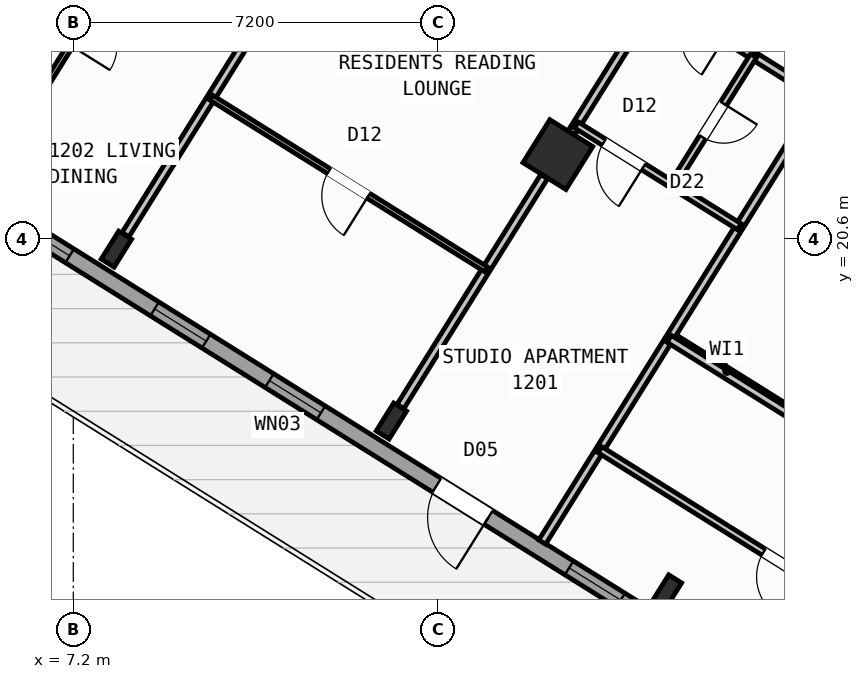
"""IFC4 building model, lengths in metres.
Left out: names, types, materials, properties, quantities, classifications, styles, units other than length and angle.
Written with IfcOpenShell. Run it as: python <this file> out.ifc"""

import sys

from ifc_helpers import new_model, si_unit, direction, frame, frame_2d, origin, origin_2d, place, context, subcontext, project, spatial, rectangle, hollow_rectangle, i_section, extrude, source, transform, mapped, element, fill, save


model = new_model("IFC4")
c1 = context("Model", 3, precision=1e-05, world=origin(), true_north=direction((0.0, 1.0)))
c2 = subcontext(c1, "Body", "Model", "MODEL_VIEW")
j1 = project(units=[si_unit("LENGTHUNIT", "METRE"), si_unit("PLANEANGLEUNIT", "RADIAN")], contexts=[c1])
p1 = place(None, origin())
s1 = spatial("IfcSite", under=j1, at=p1, CompositionType="ELEMENT")
p2 = place(p1, origin())
s2 = spatial("IfcBuilding", under=s1, at=p2, CompositionType="ELEMENT")
p3 = place(p2, frame((0.0, 0.0, 49.2)))
s3 = spatial("IfcBuildingStorey", under=s2, at=p3, CompositionType="ELEMENT", Elevation=49.2)
m1 = source(origin(), c2, "Body", "SweptSolid", [
    extrude(i_section(OverallWidth=0.3, OverallDepth=0.65, WebThickness=0.016, FlangeThickness=0.031, at=origin_2d()), origin(), (0.0, 0.0, 1.0), 3.6),
])
p4 = place(p3, frame((18.906, 13.612, 0.0), z_axis=(0.0, 0.0, 1.0), x_axis=(-0.848048096156, 0.529919264233, 0.0)))
e1 = element("IfcColumn", 1, at=p4, inside=s3, PredefinedType="COLUMN", context=c2, shape_type="MappedRepresentation", body=[
    mapped(m1, transform((0.0, 0.0, 0.0), scale=1.0)),
])
m2 = source(origin(), c2, "Body", "SweptSolid", [
    extrude(hollow_rectangle(XDim=1.0, YDim=1.0, WallThickness=0.04, at=origin_2d()), origin(), (0.0, 0.0, 1.0), 3.6),
])
p5 = place(p3, frame((16.764, 22.261, 0.0), z_axis=(0.0, 0.0, 1.0), x_axis=(-0.848048096156, 0.529919264233, 0.0)))
e2 = element("IfcColumn", 2, at=p5, inside=s3, PredefinedType="COLUMN", context=c2, shape_type="MappedRepresentation", body=[
    mapped(m2, transform((0.0, 0.0, 0.0), scale=1.0)),
])
for number, where, z_axis, x_axis in (
    (3, (13.478, 17.003, 0.0), (0.0, 0.0, 1.0), (-0.848, 0.53, 0.0)),
    (4, (8.051, 20.395, 0.0), (0.0, 0.0, 1.0), (-0.848, 0.53, 0.0)),
):
    element("IfcColumn", number, at=place(p3, frame(where, z_axis=z_axis, x_axis=x_axis)), inside=s3, PredefinedType="COLUMN", context=c2, shape_type="MappedRepresentation", body=[
        mapped(m1, transform((0.0, 0.0, 0.0), scale=1.0)),
    ])
p6 = place(p3, frame((29.268, 6.429, 0.0), z_axis=(0.0, 0.0, 1.0), x_axis=(-0.848049971435, 0.529916263149, 0.0)))
e5 = element("IfcWall", 5, at=p6, inside=s3, PredefinedType="STANDARD", context=c2, shape_type="SweptSolid", body=[
    extrude(rectangle(XDim=31.588, YDim=0.32, at=frame_2d((15.794, 0.0))), origin(), (0.0, 0.0, 1.0), 3.35),
])
p7 = place(p6, frame((16.362, 0.0, 0.0)))
e6 = element("IfcOpeningElement", 6, at=p7, cuts=e5, PredefinedType="OPENING", context=c2, shape_type="SweptSolid", body=[
    extrude(rectangle(XDim=1.2, YDim=2.15, at=frame_2d((0.6, 1.075))), frame((0.0, 0.17, 0.0), z_axis=(0.0, -1.0, 0.0), x_axis=(1.0, 0.0, 0.0)), (0.0, 0.0, 1.0), 0.34),
])
p8 = place(p6, frame((2.989, 0.0, 0.8)))
e7 = element("IfcOpeningElement", 7, at=p8, cuts=e5, PredefinedType="OPENING", context=c2, shape_type="SweptSolid", body=[
    extrude(rectangle(XDim=2.1, YDim=1.55, at=frame_2d((1.05, 0.775))), frame((0.0, 0.17, 0.0), z_axis=(0.0, -1.0, 0.0), x_axis=(1.0, 0.0, 0.0)), (0.0, 0.0, 1.0), 0.34),
])
p9 = place(p6, frame((8.359, 0.0, 0.8)))
e8 = element("IfcOpeningElement", 8, at=p9, cuts=e5, PredefinedType="OPENING", context=c2, shape_type="SweptSolid", body=[
    extrude(rectangle(XDim=2.1, YDim=1.55, at=frame_2d((1.05, 0.775))), frame((0.0, 0.17, 0.0), z_axis=(0.0, -1.0, 0.0), x_axis=(1.0, 0.0, 0.0)), (0.0, 0.0, 1.0), 0.34),
])
p10 = place(p6, frame((13.284, 0.0, 0.95)))
e9 = element("IfcOpeningElement", 9, at=p10, cuts=e5, PredefinedType="OPENING", context=c2, shape_type="SweptSolid", body=[
    extrude(rectangle(XDim=1.2, YDim=1.4, at=frame_2d((0.6, 0.7))), frame((0.0, 0.17, 0.0), z_axis=(0.0, -1.0, 0.0), x_axis=(1.0, 0.0, 0.0)), (0.0, 0.0, 1.0), 0.34),
])
p11 = place(p6, frame((20.259, 0.0, 0.95)))
e10 = element("IfcOpeningElement", 10, at=p11, cuts=e5, PredefinedType="OPENING", context=c2, shape_type="SweptSolid", body=[
    extrude(rectangle(XDim=1.2, YDim=1.4, at=frame_2d((0.6, 0.7))), frame((0.0, 0.17, 0.0), z_axis=(0.0, -1.0, 0.0), x_axis=(1.0, 0.0, 0.0)), (0.0, 0.0, 1.0), 0.34),
])
p12 = place(p6, frame((22.929, 0.0, 0.95)))
e11 = element("IfcOpeningElement", 11, at=p12, cuts=e5, PredefinedType="OPENING", context=c2, shape_type="SweptSolid", body=[
    extrude(rectangle(XDim=1.2, YDim=1.4, at=frame_2d((0.6, 0.7))), frame((0.0, 0.17, 0.0), z_axis=(0.0, -1.0, 0.0), x_axis=(1.0, 0.0, 0.0)), (0.0, 0.0, 1.0), 0.34),
])
p13 = place(p6, frame((26.106, 0.0, 0.85)))
e12 = element("IfcOpeningElement", 12, at=p13, cuts=e5, PredefinedType="OPENING", context=c2, shape_type="SweptSolid", body=[
    extrude(rectangle(XDim=1.5, YDim=1.5, at=frame_2d((0.75, 0.75))), frame((0.0, 0.17, 0.0), z_axis=(0.0, -1.0, 0.0), x_axis=(1.0, 0.0, 0.0)), (0.0, 0.0, 1.0), 0.34),
])
p14 = place(p6, frame((29.068, 0.0, 0.85)))
e13 = element("IfcOpeningElement", 13, at=p14, cuts=e5, PredefinedType="OPENING", context=c2, shape_type="SweptSolid", body=[
    extrude(rectangle(XDim=1.8, YDim=1.5, at=frame_2d((0.9, 0.75))), frame((0.0, 0.17, 0.0), z_axis=(0.0, -1.0, 0.0), x_axis=(1.0, 0.0, 0.0)), (0.0, 0.0, 1.0), 0.34),
])
p15 = place(p3, frame((2.415, 23.452, 0.0), z_axis=(0.0, 0.0, 1.0), x_axis=(0.52991049553, 0.848053575387, 0.0)))
e14 = element("IfcWall", 14, at=p15, inside=s3, PredefinedType="STANDARD", context=c2, shape_type="SweptSolid", body=[
    extrude(rectangle(XDim=21.587, YDim=0.32, at=frame_2d((10.794, 0.0))), origin(), (0.0, 0.0, 1.0), 2.725),
])
p16 = place(p15, frame((2.356, 0.0, 0.8)))
e15 = element("IfcOpeningElement", 15, at=p16, cuts=e14, PredefinedType="OPENING", context=c2, shape_type="SweptSolid", body=[
    extrude(rectangle(XDim=2.1, YDim=1.55, at=frame_2d((1.05, 0.775))), frame((0.0, 0.17, 0.0), z_axis=(0.0, -1.0, 0.0), x_axis=(1.0, 0.0, 0.0)), (0.0, 0.0, 1.0), 0.34),
])
p17 = place(p15, frame((8.639, 0.0, 1.0)))
e16 = element("IfcOpeningElement", 16, at=p17, cuts=e14, PredefinedType="OPENING", context=c2, shape_type="SweptSolid", body=[
    extrude(rectangle(XDim=0.9, YDim=1.25, at=frame_2d((0.45, 0.625))), frame((0.0, 0.17, 0.0), z_axis=(0.0, -1.0, 0.0), x_axis=(1.0, 0.0, 0.0)), (0.0, 0.0, 1.0), 0.34),
])
p18 = place(p15, frame((17.129, 0.0, 0.85)))
e17 = element("IfcOpeningElement", 17, at=p18, cuts=e14, PredefinedType="OPENING", context=c2, shape_type="SweptSolid", body=[
    extrude(rectangle(XDim=1.5, YDim=1.5, at=frame_2d((0.75, 0.75))), frame((0.0, 0.17, 0.0), z_axis=(0.0, -1.0, 0.0), x_axis=(1.0, 0.0, 0.0)), (0.0, 0.0, 1.0), 0.34),
])
p19 = place(p3, frame((21.206, 17.292, 0.0), z_axis=(0.0, 0.0, 1.0), x_axis=(-0.848050851465, 0.529914854792, 0.0)))
e18 = element("IfcWall", 18, at=p19, inside=s3, PredefinedType="PARTITIONING", context=c2, shape_type="SweptSolid", body=[
    extrude(rectangle(XDim=2.61, YDim=0.16, at=frame_2d((1.305, 0.0))), origin(), (0.0, 0.0, 1.0), 3.34),
])
p20 = place(p3, frame((21.938, 23.391, 0.0), z_axis=(0.0, 0.0, 1.0), x_axis=(-0.529924725692, -0.848044683434, 0.0)))
e19 = element("IfcWall", 19, at=p20, inside=s3, PredefinedType="PARTITIONING", context=c2, shape_type="SweptSolid", body=[
    extrude(rectangle(XDim=10.35, YDim=0.16, at=frame_2d((5.175, 0.0))), origin(), (0.0, 0.0, 1.0), 3.34),
])
p21 = place(p3, frame((21.938, 23.391, 0.0), z_axis=(0.0, 0.0, 1.0), x_axis=(-0.848045850158, 0.529922858565, 0.0)))
e20 = element("IfcWall", 20, at=p21, inside=s3, PredefinedType="PARTITIONING", context=c2, shape_type="SweptSolid", body=[
    extrude(rectangle(XDim=16.73, YDim=0.16, at=frame_2d((8.365, 0.0))), origin(), (0.0, 0.0, 1.0), 3.34),
])
p22 = place(p21, frame((2.22, 0.0, 0.0)))
e21 = element("IfcOpeningElement", 21, at=p22, cuts=e20, PredefinedType="OPENING", context=c2, shape_type="SweptSolid", body=[
    extrude(rectangle(XDim=0.86, YDim=2.05, at=frame_2d((0.43, 1.025))), frame((0.0, 0.09, 0.0), z_axis=(0.0, -1.0, 0.0), x_axis=(1.0, 0.0, 0.0)), (0.0, 0.0, 1.0), 0.18),
])
p23 = place(p21, frame((6.49, 0.0, 0.0)))
e22 = element("IfcOpeningElement", 22, at=p23, cuts=e20, PredefinedType="OPENING", context=c2, shape_type="SweptSolid", body=[
    extrude(rectangle(XDim=1.0, YDim=2.1, at=frame_2d((0.5, 1.05))), frame((0.0, 0.09, 0.0), z_axis=(0.0, -1.0, 0.0), x_axis=(1.0, 0.0, 0.0)), (0.0, 0.0, 1.0), 0.18),
])
p24 = place(p21, frame((11.14, 0.0, 0.0)))
e23 = element("IfcOpeningElement", 23, at=p24, cuts=e20, PredefinedType="OPENING", context=c2, shape_type="SweptSolid", body=[
    extrude(rectangle(XDim=1.0, YDim=2.1, at=frame_2d((0.5, 1.05))), frame((0.0, 0.09, 0.0), z_axis=(0.0, -1.0, 0.0), x_axis=(1.0, 0.0, 0.0)), (0.0, 0.0, 1.0), 0.18),
])
p25 = place(p3, frame((18.724, 25.399, 0.0), z_axis=(0.0, 0.0, 1.0), x_axis=(-0.529930102756, -0.848041323399, 0.0)))
e24 = element("IfcWall", 24, at=p25, inside=s3, PredefinedType="PARTITIONING", context=c2, shape_type="SweptSolid", body=[
    extrude(rectangle(XDim=3.188, YDim=0.16, at=frame_2d((1.594, 0.0))), origin(), (0.0, 0.0, 1.0), 2.725),
])
p26 = place(p3, frame((16.492, 21.827, 0.0), z_axis=(0.0, 0.0, 1.0), x_axis=(-0.529904608059, -0.848057254175, 0.0)))
e25 = element("IfcWall", 25, at=p26, inside=s3, PredefinedType="PARTITIONING", context=c2, shape_type="SweptSolid", body=[
    extrude(rectangle(XDim=5.351, YDim=0.16, at=frame_2d((2.675, 0.0))), origin(), (0.0, 0.0, 1.0), 2.725),
])
p27 = place(p3, frame((20.343, 20.838, 0.0), z_axis=(0.0, 0.0, 1.0), x_axis=(-0.848059820872, 0.529900500304, 0.0)))
e26 = element("IfcWall", 26, at=p27, inside=s3, PredefinedType="PLUMBINGWALL", context=c2, shape_type="SweptSolid", body=[
    extrude(rectangle(XDim=3.79, YDim=0.14, at=frame_2d((1.895, 0.0))), origin(), (0.0, 0.0, 1.0), 3.34),
])
p28 = place(p27, frame((2.23, 0.0, 0.0)))
e27 = element("IfcOpeningElement", 27, at=p28, cuts=e26, PredefinedType="OPENING", context=c2, shape_type="SweptSolid", body=[
    extrude(rectangle(XDim=0.92, YDim=2.08, at=frame_2d((0.46, 1.04))), frame((0.0, 0.08, 0.0), z_axis=(0.0, -1.0, 0.0), x_axis=(1.0, 0.0, 0.0)), (0.0, 0.0, 1.0), 0.16),
])
p29 = place(p3, frame((20.624, 24.212, 0.0), z_axis=(0.0, 0.0, 1.0), x_axis=(-0.529940615993, -0.848034753722, 0.0)))
e28 = element("IfcWall", 28, at=p29, inside=s3, PredefinedType="PLUMBINGWALL", context=c2, shape_type="SweptSolid", body=[
    extrude(rectangle(XDim=3.01, YDim=0.14, at=frame_2d((1.505, 0.0))), origin(), (0.0, 0.0, 1.0), 2.995),
])
p30 = place(p29, frame((1.115, 0.0, 0.0)))
e29 = element("IfcOpeningElement", 29, at=p30, cuts=e28, PredefinedType="OPENING", context=c2, shape_type="SweptSolid", body=[
    extrude(rectangle(XDim=0.78, YDim=2.05, at=frame_2d((0.39, 1.025))), frame((0.0, 0.08, 0.0), z_axis=(0.0, -1.0, 0.0), x_axis=(1.0, 0.0, 0.0)), (0.0, 0.0, 1.0), 0.16),
])
p31 = place(p3, frame((11.065, 25.219, 0.0), z_axis=(0.0, 0.0, 1.0), x_axis=(-0.529904608059, -0.848057254175, 0.0)))
e30 = element("IfcWall", 30, at=p31, inside=s3, PredefinedType="PARTITIONING", context=c2, shape_type="SweptSolid", body=[
    extrude(rectangle(XDim=5.351, YDim=0.16, at=frame_2d((2.675, 0.0))), origin(), (0.0, 0.0, 1.0), 2.725),
])
p32 = place(p3, frame((15.348, 19.995, 0.0), z_axis=(0.0, 0.0, 1.0), x_axis=(-0.848056163074, 0.529906354247, 0.0)))
e31 = element("IfcWall", 31, at=p32, inside=s3, PredefinedType="PARTITIONING", context=c2, shape_type="SweptSolid", body=[
    extrude(rectangle(XDim=6.4, YDim=0.11, at=frame_2d((3.2, 0.0))), origin(), (0.0, 0.0, 1.0), 3.34),
])
p33 = place(p32, frame((2.74, 0.0, 0.0)))
e32 = element("IfcOpeningElement", 32, at=p33, cuts=e31, PredefinedType="OPENING", context=c2, shape_type="SweptSolid", body=[
    extrude(rectangle(XDim=0.92, YDim=2.08, at=frame_2d((0.46, 1.04))), frame((0.0, 0.065, 0.0), z_axis=(0.0, -1.0, 0.0), x_axis=(1.0, 0.0, 0.0)), (0.0, 0.0, 1.0), 0.13),
])
p34 = place(p3, frame((10.837, 30.327, 0.0), z_axis=(0.0, 0.0, 1.0), x_axis=(-0.529912148489, -0.848052542525, 0.0)))
e33 = element("IfcWall", 33, at=p34, inside=s3, PredefinedType="PARTITIONING", context=c2, shape_type="SweptSolid", body=[
    extrude(rectangle(XDim=10.62, YDim=0.11, at=frame_2d((5.31, 0.0))), origin(), (0.0, 0.0, 1.0), 3.34),
])
p35 = place(p34, frame((0.76, 0.0, 0.0)))
e34 = element("IfcOpeningElement", 34, at=p35, cuts=e33, PredefinedType="OPENING", context=c2, shape_type="SweptSolid", body=[
    extrude(rectangle(XDim=0.78, YDim=2.05, at=frame_2d((0.39, 1.025))), frame((0.0, 0.065, 0.0), z_axis=(0.0, -1.0, 0.0), x_axis=(1.0, 0.0, 0.0)), (0.0, 0.0, 1.0), 0.13),
])
p36 = place(p34, frame((6.05, 0.0, 0.0)))
e35 = element("IfcOpeningElement", 35, at=p36, cuts=e33, PredefinedType="OPENING", context=c2, shape_type="SweptSolid", body=[
    extrude(rectangle(XDim=0.92, YDim=2.08, at=frame_2d((0.46, 1.04))), frame((0.0, 0.065, 0.0), z_axis=(0.0, -1.0, 0.0), x_axis=(1.0, 0.0, 0.0)), (0.0, 0.0, 1.0), 0.13),
])
p37 = place(p3, frame((32.164, 10.374, 0.0), z_axis=(0.0, 0.0, 1.0), x_axis=(-0.848044107957, 0.529925646633, 0.0)))
e36 = element("IfcWall", 36, at=p37, inside=s3, PredefinedType="PARTITIONING", context=c2, shape_type="SweptSolid", body=[
    extrude(rectangle(XDim=15.57, YDim=0.16, at=frame_2d((7.785, 0.0))), origin(), (0.0, 0.0, 1.0), 3.34),
])
p38 = place(p37, frame((10.83, 0.0, 0.0)))
e37 = element("IfcOpeningElement", 37, at=p38, cuts=e36, PredefinedType="OPENING", context=c2, shape_type="SweptSolid", body=[
    extrude(rectangle(XDim=1.0, YDim=2.1, at=frame_2d((0.5, 1.05))), frame((0.0, 0.09, 0.0), z_axis=(0.0, -1.0, 0.0), x_axis=(1.0, 0.0, 0.0)), (0.0, 0.0, 1.0), 0.18),
])
p39 = place(p3, frame((29.72, 8.859, 0.0), z_axis=(0.0, 0.0, 1.0), x_axis=(-0.848049134363, 0.529917602752, 0.0)))
e38 = element("IfcWall", 38, at=p39, inside=s3, PredefinedType="PLUMBINGWALL", context=c2, shape_type="SweptSolid", body=[
    extrude(rectangle(XDim=14.3, YDim=0.14, at=frame_2d((7.15, 0.0))), origin(), (0.0, 0.0, 1.0), 3.34),
])
p40 = place(p39, frame((9.57, 0.0, 0.0)))
e39 = element("IfcOpeningElement", 39, at=p40, cuts=e38, PredefinedType="OPENING", context=c2, shape_type="SweptSolid", body=[
    extrude(rectangle(XDim=0.92, YDim=2.08, at=frame_2d((0.46, 1.04))), frame((0.0, 0.08, 0.0), z_axis=(0.0, -1.0, 0.0), x_axis=(1.0, 0.0, 0.0)), (0.0, 0.0, 1.0), 0.16),
])
m3 = source(origin(), c2, "Body", "SweptSolid", [
    extrude(rectangle(XDim=1.2, YDim=2.15, at=frame_2d((0.6, 1.075))), frame((0.0, 0.025, 0.0), z_axis=(0.0, -1.0, 0.0), x_axis=(1.0, 0.0, 0.0)), (0.0, 0.0, 1.0), 0.05),
])
p41 = place(p7, origin())
e40 = element("IfcDoor", 40, at=p41, inside=s3, OperationType="SINGLE_SWING_LEFT", PredefinedType="DOOR", context=c2, shape_type="MappedRepresentation", body=[
    mapped(m3, transform((0.0, 0.0, 0.0), scale=1.0)),
])
fill(e6, e40)
m4 = source(origin(), c2, "Body", "SweptSolid", [
    extrude(rectangle(XDim=1.2, YDim=1.4, at=frame_2d((0.6, 0.7))), frame((0.0, 0.03, 0.0), z_axis=(0.0, -1.0, 0.0), x_axis=(1.0, 0.0, 0.0)), (0.0, 0.0, 1.0), 0.06),
])
p42 = place(p10, origin())
e41 = element("IfcWindow", 41, at=p42, inside=s3, PartitioningType="SINGLE_PANEL", PredefinedType="WINDOW", context=c2, shape_type="MappedRepresentation", body=[
    mapped(m4, transform((0.0, 0.0, 0.0), scale=1.0)),
])
fill(e9, e41)
p43 = place(p11, origin())
e42 = element("IfcWindow", 42, at=p43, inside=s3, PartitioningType="SINGLE_PANEL", PredefinedType="WINDOW", context=c2, shape_type="MappedRepresentation", body=[
    mapped(m4, transform((0.0, 0.0, 0.0), scale=1.0)),
])
fill(e10, e42)
p44 = place(p12, origin())
e43 = element("IfcWindow", 43, at=p44, inside=s3, PartitioningType="SINGLE_PANEL", PredefinedType="WINDOW", context=c2, shape_type="MappedRepresentation", body=[
    mapped(m4, transform((0.0, 0.0, 0.0), scale=1.0)),
])
fill(e11, e43)
m5 = source(origin(), c2, "Body", "SweptSolid", [
    extrude(rectangle(XDim=1.5, YDim=1.5, at=frame_2d((0.75, 0.75))), frame((0.0, 0.03, 0.0), z_axis=(0.0, -1.0, 0.0), x_axis=(1.0, 0.0, 0.0)), (0.0, 0.0, 1.0), 0.06),
])
p45 = place(p13, origin())
e44 = element("IfcWindow", 44, at=p45, inside=s3, PartitioningType="SINGLE_PANEL", PredefinedType="WINDOW", context=c2, shape_type="MappedRepresentation", body=[
    mapped(m5, transform((0.0, 0.0, 0.0), scale=1.0)),
])
fill(e12, e44)
m6 = source(origin(), c2, "Body", "SweptSolid", [
    extrude(rectangle(XDim=0.92, YDim=2.08, at=frame_2d((0.46, 1.04))), frame((0.0, 0.025, 0.0), z_axis=(0.0, -1.0, 0.0), x_axis=(1.0, 0.0, 0.0)), (0.0, 0.0, 1.0), 0.05),
])
p46 = place(p28, origin())
e45 = element("IfcDoor", 45, at=p46, inside=s3, OperationType="SINGLE_SWING_LEFT", PredefinedType="DOOR", context=c2, shape_type="MappedRepresentation", body=[
    mapped(m6, transform((0.0, 0.0, 0.0), scale=1.0)),
])
fill(e27, e45)
m7 = source(origin(), c2, "Body", "SweptSolid", [
    extrude(rectangle(XDim=0.78, YDim=2.05, at=frame_2d((0.39, 1.025))), frame((0.0, 0.025, 0.0), z_axis=(0.0, -1.0, 0.0), x_axis=(1.0, 0.0, 0.0)), (0.0, 0.0, 1.0), 0.05),
])
p47 = place(p30, origin())
e46 = element("IfcDoor", 46, at=p47, inside=s3, OperationType="SINGLE_SWING_LEFT", PredefinedType="DOOR", context=c2, shape_type="MappedRepresentation", body=[
    mapped(m7, transform((0.0, 0.0, 0.0), scale=1.0)),
])
fill(e29, e46)
p48 = place(p33, origin())
e47 = element("IfcDoor", 47, at=p48, inside=s3, OperationType="SINGLE_SWING_LEFT", PredefinedType="DOOR", context=c2, shape_type="MappedRepresentation", body=[
    mapped(m6, transform((0.0, 0.0, 0.0), scale=1.0)),
])
fill(e32, e47)
p49 = place(p40, origin())
e48 = element("IfcDoor", 48, at=p49, inside=s3, OperationType="SINGLE_SWING_LEFT", PredefinedType="DOOR", context=c2, shape_type="MappedRepresentation", body=[
    mapped(m6, transform((0.0, 0.0, 0.0), scale=1.0)),
])
fill(e39, e48)
save(model, sys.argv[1])
